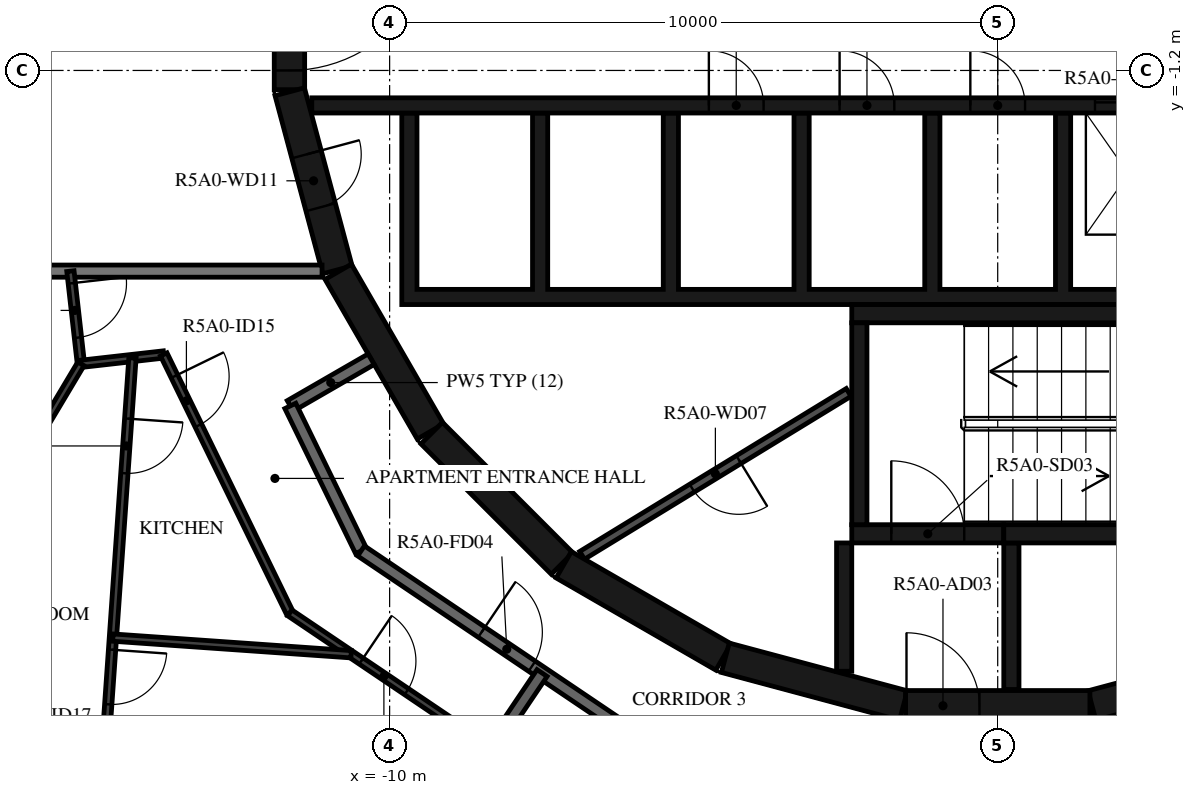
"""IFC4 building model, lengths in metres.
Left out: names, types, materials, properties, quantities, classifications, styles, units other than length and angle.
Written with IfcOpenShell. Run it as: python <this file> out.ifc"""

import sys

from ifc_helpers import new_model, si_unit, direction, frame, frame_2d, origin, place, context, subcontext, project, spatial, polyline, rectangle, outline, extrude, element, fill, save


model = new_model("IFC4")
c1 = context("Model", 3, precision=1e-05, world=origin(), true_north=direction((0.0, 1.0)))
c2 = subcontext(c1, "Body", "Model", "MODEL_VIEW")
j1 = project(units=[si_unit("LENGTHUNIT", "METRE"), si_unit("PLANEANGLEUNIT", "RADIAN")], contexts=[c1])
p1 = place(None, origin())
s1 = spatial("IfcSite", under=j1, at=p1, CompositionType="ELEMENT")
p2 = place(p1, origin())
s2 = spatial("IfcBuilding", under=s1, at=p2, CompositionType="ELEMENT")
p3 = place(p2, frame((0.0, 0.0, 195.4)))
s3 = spatial("IfcBuildingStorey", under=s2, at=p3, CompositionType="ELEMENT", Elevation=195.4)
p4 = place(p3, frame((1.55, -11.643, 0.0), z_axis=(0.0, 0.0, 1.0), x_axis=(0.965948410781, 0.258734743916, 0.0)))
e1 = element("IfcWall", 1, at=p4, inside=s3, PredefinedType="SHEAR", context=c2, shape_type="SweptSolid", body=[
    extrude(rectangle(XDim=3.033, YDim=0.5, at=frame_2d((1.516, 0.0))), origin(), (0.0, 0.0, 1.0), 3.12),
])
p5 = place(p3, frame((-11.647, 1.516, 0.0), z_axis=(0.0, 0.0, 1.0), x_axis=(0.0, -1.0, 0.0)))
e2 = element("IfcWall", 2, at=p5, inside=s3, PredefinedType="SHEAR", context=c2, shape_type="SweptSolid", body=[
    extrude(rectangle(XDim=3.033, YDim=0.5, at=frame_2d((1.516, 0.0))), origin(), (0.0, 0.0, 1.0), 3.12),
])
p6 = place(p5, frame((0.316, 0.0, 0.0)))
e3 = element("IfcOpeningElement", 3, at=p6, cuts=e2, PredefinedType="OPENING", context=c2, shape_type="SweptSolid", body=[
    extrude(rectangle(XDim=2.4, YDim=2.1, at=frame_2d((1.2, 1.05))), frame((0.0, 0.26, 0.0), z_axis=(0.0, -1.0, 0.0), x_axis=(1.0, 0.0, 0.0)), (0.0, 0.0, 1.0), 0.52),
])
p7 = place(p3, frame((-11.643, -1.55, 0.0), z_axis=(0.0, 0.0, 1.0), x_axis=(0.258734743916, -0.965948410781, 0.0)))
e4 = element("IfcWall", 4, at=p7, inside=s3, PredefinedType="SHEAR", context=c2, shape_type="SweptSolid", body=[
    extrude(rectangle(XDim=3.033, YDim=0.5, at=frame_2d((1.516, 0.0))), origin(), (0.0, 0.0, 1.0), 3.12),
])
p8 = place(p7, frame((1.066, 0.0, 0.0)))
e5 = element("IfcOpeningElement", 5, at=p8, cuts=e4, PredefinedType="OPENING", context=c2, shape_type="SweptSolid", body=[
    extrude(rectangle(XDim=0.9, YDim=2.1, at=frame_2d((0.45, 1.05))), frame((0.0, 0.26, 0.0), z_axis=(0.0, -1.0, 0.0), x_axis=(1.0, 0.0, 0.0)), (0.0, 0.0, 1.0), 0.52),
])
p9 = place(p3, frame((-10.845, -4.51, 0.0), z_axis=(0.0, 0.0, 1.0), x_axis=(0.500087131594, -0.865975092491, 0.0)))
e6 = element("IfcWall", 6, at=p9, inside=s3, PredefinedType="SHEAR", context=c2, shape_type="SweptSolid", body=[
    extrude(rectangle(XDim=3.033, YDim=0.5, at=frame_2d((1.516, 0.0))), origin(), (0.0, 0.0, 1.0), 3.12),
])
p10 = place(p3, frame((-9.308, -7.164, 0.0), z_axis=(0.0, 0.0, 1.0), x_axis=(0.707106781187, -0.707106781187, 0.0)))
e7 = element("IfcWall", 7, at=p10, inside=s3, PredefinedType="SHEAR", context=c2, shape_type="SweptSolid", body=[
    extrude(rectangle(XDim=3.032, YDim=0.5, at=frame_2d((1.516, 0.0))), origin(), (0.0, 0.0, 1.0), 3.12),
])
for number, where, z_axis, x_axis in (
    (8, (-7.137, -9.329, 0.0), (0.0, 0.0, 1.0), (0.866, -0.5, 0.0)),
    (9, (-4.479, -10.858, 0.0), (0.0, 0.0, 1.0), (0.966, -0.259, 0.0)),
):
    element("IfcWall", number, at=place(p3, frame(where, z_axis=z_axis, x_axis=x_axis)), inside=s3, PredefinedType="SHEAR", context=c2, shape_type="SweptSolid", body=[
        extrude(rectangle(XDim=3.033, YDim=0.5, at=frame_2d((1.516, 0.0))), origin(), (0.0, 0.0, 1.0), 3.12),
    ])
p11 = place(p3, frame((-1.516, -11.647, 0.0), z_axis=(0.0, 0.0, 1.0), x_axis=(1.0, 0.0, 0.0)))
e10 = element("IfcWall", 10, at=p11, inside=s3, PredefinedType="SHEAR", context=c2, shape_type="SweptSolid", body=[
    extrude(rectangle(XDim=3.033, YDim=0.5, at=frame_2d((1.516, 0.0))), origin(), (0.0, 0.0, 1.0), 3.12),
])
p12 = place(p11, frame((0.016, 0.0, 0.0)))
e11 = element("IfcOpeningElement", 11, at=p12, cuts=e10, PredefinedType="OPENING", context=c2, shape_type="SweptSolid", body=[
    extrude(rectangle(XDim=1.2, YDim=2.1, at=frame_2d((0.6, 1.05))), frame((0.0, 0.26, 0.0), z_axis=(0.0, -1.0, 0.0), x_axis=(1.0, 0.0, 0.0)), (0.0, 0.0, 1.0), 0.52),
])
p13 = place(p3, frame((-2.275, -8.67, 0.0), z_axis=(0.0, 0.0, 1.0), x_axis=(0.0, 1.0, 0.0)))
e12 = element("IfcWall", 12, at=p13, inside=s3, PredefinedType="SHEAR", context=c2, shape_type="SweptSolid", body=[
    extrude(rectangle(XDim=3.32, YDim=0.25, at=frame_2d((1.66, 0.0))), origin(), (0.0, 0.0, 1.0), 3.12),
])
p14 = place(p3, frame((-2.4, -5.2, 0.0), z_axis=(0.0, 0.0, 1.0), x_axis=(1.0, 0.0, 0.0)))
e13 = element("IfcWall", 13, at=p14, inside=s3, PredefinedType="SHEAR", context=c2, shape_type="SweptSolid", body=[
    extrude(rectangle(XDim=7.05, YDim=0.3, at=frame_2d((3.525, 0.0))), origin(), (0.0, 0.0, 1.0), 3.12),
])
p15 = place(p3, frame((0.1, -8.82, 0.0), z_axis=(0.0, 0.0, 1.0), x_axis=(1.0, 0.0, 0.0)))
e14 = element("IfcWall", 14, at=p15, inside=s3, PredefinedType="SHEAR", context=c2, shape_type="SweptSolid", body=[
    extrude(rectangle(XDim=4.55, YDim=0.3, at=frame_2d((2.275, 0.0))), origin(), (0.0, 0.0, 1.0), 3.12),
])
p16 = place(p3, frame((-2.4, -8.82, 0.0), z_axis=(0.0, 0.0, 1.0), x_axis=(1.0, 0.0, 0.0)))
e15 = element("IfcWall", 15, at=p16, inside=s3, PredefinedType="SHEAR", context=c2, shape_type="SweptSolid", body=[
    extrude(rectangle(XDim=2.5, YDim=0.3, at=frame_2d((1.25, 0.0))), origin(), (0.0, 0.0, 1.0), 3.12),
])
p17 = place(p16, frame((0.65, 0.0, 0.0)))
e16 = element("IfcOpeningElement", 16, at=p17, cuts=e15, PredefinedType="OPENING", context=c2, shape_type="SweptSolid", body=[
    extrude(rectangle(XDim=1.2, YDim=2.1, at=frame_2d((0.6, 1.05))), frame((0.0, 0.16, 0.0), z_axis=(0.0, -1.0, 0.0), x_axis=(1.0, 0.0, 0.0)), (0.0, 0.0, 1.0), 0.32),
])
p18 = place(p3, frame((-2.525, -8.97, 0.0), z_axis=(0.0, 0.0, 1.0), x_axis=(0.0, -1.0, 0.0)))
e17 = element("IfcWall", 17, at=p18, inside=s3, PredefinedType="SHEAR", context=c2, shape_type="SweptSolid", body=[
    extrude(rectangle(XDim=2.11, YDim=0.25, at=frame_2d((1.055, 0.0))), origin(), (0.0, 0.0, 1.0), 3.12),
])
p19 = place(p3, frame((0.225, -8.97, 0.0), z_axis=(0.0, 0.0, 1.0), x_axis=(0.0, -1.0, 0.0)))
e18 = element("IfcWall", 18, at=p19, inside=s3, PredefinedType="SHEAR", context=c2, shape_type="SweptSolid", body=[
    extrude(rectangle(XDim=2.41, YDim=0.25, at=frame_2d((1.205, 0.0))), origin(), (0.0, 0.0, 1.0), 3.12),
])
p20 = place(p3, origin())
e19 = element("IfcWall", 19, at=p20, inside=s3, PredefinedType="SHEAR", context=c2, shape_type="SweptSolid", body=[
    extrude(outline(polyline([(9.8, -5.05), (9.8, -4.8), (9.8, -1.9), (9.55, -1.9), (9.55, -4.8), (7.65, -4.8), (7.65, -1.9), (7.4, -1.9), (7.4, -4.8), (5.5, -4.8), (5.5, -1.9), (5.25, -1.9), (5.25, -4.8), (3.35, -4.8), (3.35, -1.9), (3.1, -1.9), (3.1, -4.8), (1.2, -4.8), (1.2, -1.9), (0.95, -1.9), (0.95, -4.8), (-0.95, -4.8), (-0.95, -1.9), (-1.2, -1.9), (-1.2, -4.8), (-3.1, -4.8), (-3.1, -1.9), (-3.35, -1.9), (-3.35, -4.8), (-5.25, -4.8), (-5.25, -1.9), (-5.5, -1.9), (-5.5, -4.8), (-7.4, -4.8), (-7.4, -1.9), (-7.65, -1.9), (-7.65, -4.8), (-9.55, -4.8), (-9.55, -1.9), (-9.8, -1.9), (-9.8, -4.8), (-9.8, -5.05), (9.8, -5.05)])), origin(), (0.0, 0.0, 1.0), 3.12),
])
p21 = place(p3, frame((-11.28, -1.775, 0.0), z_axis=(0.0, 0.0, 1.0), x_axis=(1.0, 0.0, 0.0)))
e20 = element("IfcWall", 20, at=p21, inside=s3, PredefinedType="SHEAR", context=c2, shape_type="SweptSolid", body=[
    extrude(rectangle(XDim=14.38, YDim=0.25, at=frame_2d((7.19, 0.0))), origin(), (0.0, 0.0, 1.0), 3.12),
])
p22 = place(p21, frame((12.88, 0.0, 0.0)))
e21 = element("IfcOpeningElement", 21, at=p22, cuts=e20, PredefinedType="OPENING", context=c2, shape_type="SweptSolid", body=[
    extrude(rectangle(XDim=1.1, YDim=2.1, at=frame_2d((0.55, 1.05))), frame((0.0, 0.135, 0.0), z_axis=(0.0, -1.0, 0.0), x_axis=(1.0, 0.0, 0.0)), (0.0, 0.0, 1.0), 0.27),
])
p23 = place(p21, frame((6.53, 0.0, 0.0)))
e22 = element("IfcOpeningElement", 22, at=p23, cuts=e20, PredefinedType="OPENING", context=c2, shape_type="SweptSolid", body=[
    extrude(rectangle(XDim=0.9, YDim=2.1, at=frame_2d((0.45, 1.05))), frame((0.0, 0.135, 0.0), z_axis=(0.0, -1.0, 0.0), x_axis=(1.0, 0.0, 0.0)), (0.0, 0.0, 1.0), 0.27),
])
p24 = place(p21, frame((8.68, 0.0, 0.0)))
e23 = element("IfcOpeningElement", 23, at=p24, cuts=e20, PredefinedType="OPENING", context=c2, shape_type="SweptSolid", body=[
    extrude(rectangle(XDim=0.9, YDim=2.1, at=frame_2d((0.45, 1.05))), frame((0.0, 0.135, 0.0), z_axis=(0.0, -1.0, 0.0), x_axis=(1.0, 0.0, 0.0)), (0.0, 0.0, 1.0), 0.27),
])
p25 = place(p21, frame((10.83, 0.0, 0.0)))
e24 = element("IfcOpeningElement", 24, at=p25, cuts=e20, PredefinedType="OPENING", context=c2, shape_type="SweptSolid", body=[
    extrude(rectangle(XDim=0.9, YDim=2.1, at=frame_2d((0.45, 1.05))), frame((0.0, 0.135, 0.0), z_axis=(0.0, -1.0, 0.0), x_axis=(1.0, 0.0, 0.0)), (0.0, 0.0, 1.0), 0.27),
])
p26 = place(p3, frame((-2.451, -6.495, 0.0), z_axis=(0.0, 0.0, 1.0), x_axis=(-0.853250115418, -0.521501908471, 0.0)))
e25 = element("IfcWall", 25, at=p26, inside=s3, PredefinedType="PARTITIONING", context=c2, shape_type="SweptSolid", body=[
    extrude(rectangle(XDim=5.137, YDim=0.15, at=frame_2d((2.569, 0.0))), origin(), (0.0, 0.0, 1.0), 3.12),
])
p27 = place(p26, frame((2.119, 0.0, 0.0)))
e26 = element("IfcOpeningElement", 26, at=p27, cuts=e25, PredefinedType="OPENING", context=c2, shape_type="SweptSolid", body=[
    extrude(rectangle(XDim=0.9, YDim=2.1, at=frame_2d((0.45, 1.05))), frame((0.0, 0.085, 0.0), z_axis=(0.0, -1.0, 0.0), x_axis=(1.0, 0.0, 0.0)), (0.0, 0.0, 1.0), 0.17),
])
p28 = place(p3, frame((-10.303, -5.949, 0.0), z_axis=(0.0, 0.0, 1.0), x_axis=(-0.866042588199, -0.499970234539, 0.0)))
e27 = element("IfcWall", 27, at=p28, inside=s3, PredefinedType="STANDARD", context=c2, shape_type="SweptSolid", body=[
    extrude(rectangle(XDim=1.535, YDim=0.2, at=frame_2d((0.768, 0.0))), origin(), (0.0, 0.0, 1.0), 3.12),
])
p29 = place(p3, frame((-11.633, -6.716, 0.0), z_axis=(0.0, 0.0, 1.0), x_axis=(0.438322116278, -0.898817958422, 0.0)))
e28 = element("IfcWall", 28, at=p29, inside=s3, PredefinedType="STANDARD", context=c2, shape_type="SweptSolid", body=[
    extrude(rectangle(XDim=2.654, YDim=0.2, at=frame_2d((1.327, 0.0))), origin(), (0.0, 0.0, 1.0), 3.12),
])
p30 = place(p3, frame((-10.47, -9.101, 0.0), z_axis=(0.0, 0.0, 1.0), x_axis=(0.829035841718, -0.559195469534, 0.0)))
e29 = element("IfcWall", 29, at=p30, inside=s3, PredefinedType="STANDARD", context=c2, shape_type="SweptSolid", body=[
    extrude(rectangle(XDim=7.181, YDim=0.2, at=frame_2d((3.591, 0.0))), origin(), (0.0, 0.0, 1.0), 3.12),
])
p31 = place(p30, frame((2.39, 0.0, 0.0)))
e30 = element("IfcOpeningElement", 30, at=p31, cuts=e29, PredefinedType="OPENING", context=c2, shape_type="SweptSolid", body=[
    extrude(rectangle(XDim=1.0, YDim=2.1, at=frame_2d((0.5, 1.05))), frame((0.0, 0.11, 0.0), z_axis=(0.0, -1.0, 0.0), x_axis=(1.0, 0.0, 0.0)), (0.0, 0.0, 1.0), 0.22),
])
p32 = place(p3, frame((-18.55, -4.5, 0.0), z_axis=(0.0, 0.0, 1.0), x_axis=(1.0, 0.0, 0.0)))
e31 = element("IfcWall", 31, at=p32, inside=s3, PredefinedType="STANDARD", context=c2, shape_type="SweptSolid", body=[
    extrude(rectangle(XDim=7.438, YDim=0.2, at=frame_2d((3.719, 0.0))), origin(), (0.0, 0.0, 1.0), 3.12),
])
p33 = place(p3, frame((-10.407, -15.43, 0.0), z_axis=(0.0, 0.0, 1.0), x_axis=(0.559038328133, 0.829141813973, 0.0)))
e32 = element("IfcWall", 32, at=p33, inside=s3, PredefinedType="STANDARD", context=c2, shape_type="SweptSolid", body=[
    extrude(rectangle(XDim=5.212, YDim=0.2, at=frame_2d((2.606, 0.0))), origin(), (0.0, 0.0, 1.0), 3.12),
])
p34 = place(p3, frame((-15.25, -4.5, 0.0), z_axis=(0.0, 0.0, 1.0), x_axis=(0.1124919794, -0.99365263275, 0.0)))
e33 = element("IfcWall", 33, at=p34, inside=s3, PredefinedType="PARTITIONING", context=c2, shape_type="SweptSolid", body=[
    extrude(rectangle(XDim=1.534, YDim=0.12, at=frame_2d((0.767, 0.0))), origin(), (0.0, 0.0, 1.0), 3.12),
])
p35 = place(p34, frame((0.2, 0.0, 0.0)))
e34 = element("IfcOpeningElement", 34, at=p35, cuts=e33, PredefinedType="OPENING", context=c2, shape_type="SweptSolid", body=[
    extrude(rectangle(XDim=0.9, YDim=2.1, at=frame_2d((0.45, 1.05))), frame((0.0, 0.07, 0.0), z_axis=(0.0, -1.0, 0.0), x_axis=(1.0, 0.0, 0.0)), (0.0, 0.0, 1.0), 0.14),
])
p36 = place(p3, frame((-15.077, -6.025, 0.0), z_axis=(0.0, 0.0, 1.0), x_axis=(0.993646958109, 0.112542092746, 0.0)))
e35 = element("IfcWall", 35, at=p36, inside=s3, PredefinedType="PARTITIONING", context=c2, shape_type="SweptSolid", body=[
    extrude(rectangle(XDim=1.371, YDim=0.12, at=frame_2d((0.686, 0.0))), origin(), (0.0, 0.0, 1.0), 3.12),
])
p37 = place(p3, frame((-13.715, -5.87, 0.0), z_axis=(0.0, 0.0, 1.0), x_axis=(0.438372766482, -0.89879325632, 0.0)))
e36 = element("IfcWall", 36, at=p37, inside=s3, PredefinedType="PARTITIONING", context=c2, shape_type="SweptSolid", body=[
    extrude(rectangle(XDim=4.728, YDim=0.12, at=frame_2d((2.364, 0.0))), origin(), (0.0, 0.0, 1.0), 3.12),
])
p38 = place(p37, frame((0.4, 0.0, 0.0)))
e37 = element("IfcOpeningElement", 37, at=p38, cuts=e36, PredefinedType="OPENING", context=c2, shape_type="SweptSolid", body=[
    extrude(rectangle(XDim=0.9, YDim=2.1, at=frame_2d((0.45, 1.05))), frame((0.0, 0.07, 0.0), z_axis=(0.0, -1.0, 0.0), x_axis=(1.0, 0.0, 0.0)), (0.0, 0.0, 1.0), 0.14),
])
p39 = place(p3, frame((-11.642, -10.12, 0.0), z_axis=(0.0, 0.0, 1.0), x_axis=(0.829018066952, -0.559221820629, 0.0)))
e38 = element("IfcWall", 38, at=p39, inside=s3, PredefinedType="PARTITIONING", context=c2, shape_type="SweptSolid", body=[
    extrude(rectangle(XDim=3.992, YDim=0.12, at=frame_2d((1.996, 0.0))), origin(), (0.0, 0.0, 1.0), 3.12),
])
p40 = place(p39, frame((1.417, 0.0, 0.0)))
e39 = element("IfcOpeningElement", 39, at=p40, cuts=e38, PredefinedType="OPENING", context=c2, shape_type="SweptSolid", body=[
    extrude(rectangle(XDim=0.9, YDim=2.1, at=frame_2d((0.45, 1.05))), frame((0.0, 0.07, 0.0), z_axis=(0.0, -1.0, 0.0), x_axis=(1.0, 0.0, 0.0)), (0.0, 0.0, 1.0), 0.14),
])
p41 = place(p3, frame((-19.156, -12.863, 0.0), z_axis=(0.0, 0.0, 1.0), x_axis=(0.512316386407, 0.858796786335, 0.0)))
e40 = element("IfcWall", 40, at=p41, inside=s3, PredefinedType="PARTITIONING", context=c2, shape_type="SweptSolid", body=[
    extrude(rectangle(XDim=7.963, YDim=0.12, at=frame_2d((3.981, 0.0))), origin(), (0.0, 0.0, 1.0), 3.12),
])
p42 = place(p3, frame((-14.229, -5.929, 0.0), z_axis=(0.0, 0.0, 1.0), x_axis=(-0.069740723375, -0.997565151508, 0.0)))
e41 = element("IfcWall", 41, at=p42, inside=s3, PredefinedType="PARTITIONING", context=c2, shape_type="SweptSolid", body=[
    extrude(rectangle(XDim=10.47, YDim=0.12, at=frame_2d((5.235, 0.0))), origin(), (0.0, 0.0, 1.0), 3.12),
])
p43 = place(p42, frame((4.809, 0.0, 0.0)))
e42 = element("IfcOpeningElement", 42, at=p43, cuts=e41, PredefinedType="OPENING", context=c2, shape_type="SweptSolid", body=[
    extrude(rectangle(XDim=0.9, YDim=2.1, at=frame_2d((0.45, 1.05))), frame((0.0, 0.07, 0.0), z_axis=(0.0, -1.0, 0.0), x_axis=(1.0, 0.0, 0.0)), (0.0, 0.0, 1.0), 0.14),
])
p44 = place(p42, frame((1.0, 0.0, 0.0)))
e43 = element("IfcOpeningElement", 43, at=p44, cuts=e41, PredefinedType="OPENING", context=c2, shape_type="SweptSolid", body=[
    extrude(rectangle(XDim=0.9, YDim=2.1, at=frame_2d((0.45, 1.05))), frame((0.0, 0.07, 0.0), z_axis=(0.0, -1.0, 0.0), x_axis=(1.0, 0.0, 0.0)), (0.0, 0.0, 1.0), 0.14),
])
p45 = place(p3, frame((-14.551, -10.527, 0.0), z_axis=(0.0, 0.0, 1.0), x_axis=(0.997564247633, -0.069753651118, 0.0)))
e44 = element("IfcWall", 44, at=p45, inside=s3, PredefinedType="PARTITIONING", context=c2, shape_type="SweptSolid", body=[
    extrude(rectangle(XDim=3.927, YDim=0.12, at=frame_2d((1.963, 0.0))), origin(), (0.0, 0.0, 1.0), 3.12),
])
p46 = place(p17, origin())
e45 = element("IfcDoor", 45, at=p46, inside=s3, OperationType="SINGLE_SWING_LEFT", PredefinedType="DOOR", context=c2, shape_type="SweptSolid", body=[
    extrude(rectangle(XDim=1.2, YDim=2.1, at=frame_2d((0.6, 1.05))), frame((0.0, 0.025, 0.0), z_axis=(0.0, -1.0, 0.0), x_axis=(1.0, 0.0, 0.0)), (0.0, 0.0, 1.0), 0.05),
])
fill(e16, e45)
p47 = place(p12, origin())
e46 = element("IfcDoor", 46, at=p47, inside=s3, OperationType="SINGLE_SWING_RIGHT", PredefinedType="DOOR", context=c2, shape_type="SweptSolid", body=[
    extrude(rectangle(XDim=1.2, YDim=2.1, at=frame_2d((0.6, 1.05))), frame((0.0, 0.025, 0.0), z_axis=(0.0, -1.0, 0.0), x_axis=(1.0, 0.0, 0.0)), (0.0, 0.0, 1.0), 0.05),
])
fill(e11, e46)
p48 = place(p6, origin())
e47 = element("IfcDoor", 47, at=p48, inside=s3, OperationType="DOUBLE_DOOR_SINGLE_SWING", PredefinedType="DOOR", context=c2, shape_type="SweptSolid", body=[
    extrude(rectangle(XDim=2.4, YDim=2.1, at=frame_2d((1.2, 1.05))), frame((0.0, 0.025, 0.0), z_axis=(0.0, -1.0, 0.0), x_axis=(1.0, 0.0, 0.0)), (0.0, 0.0, 1.0), 0.05),
])
fill(e3, e47)
p49 = place(p22, origin())
e48 = element("IfcDoor", 48, at=p49, inside=s3, OperationType="DOUBLE_DOOR_SLIDING", PredefinedType="DOOR", context=c2, shape_type="SweptSolid", body=[
    extrude(rectangle(XDim=1.1, YDim=2.1, at=frame_2d((0.55, 1.05))), frame((0.0, 0.025, 0.0), z_axis=(0.0, -1.0, 0.0), x_axis=(1.0, 0.0, 0.0)), (0.0, 0.0, 1.0), 0.05),
])
fill(e21, e48)
p50 = place(p23, origin())
e49 = element("IfcDoor", 49, at=p50, inside=s3, OperationType="SINGLE_SWING_RIGHT", PredefinedType="DOOR", context=c2, shape_type="SweptSolid", body=[
    extrude(rectangle(XDim=0.9, YDim=2.1, at=frame_2d((0.45, 1.05))), frame((0.0, 0.025, 0.0), z_axis=(0.0, -1.0, 0.0), x_axis=(1.0, 0.0, 0.0)), (0.0, 0.0, 1.0), 0.05),
])
fill(e22, e49)
p51 = place(p24, origin())
e50 = element("IfcDoor", 50, at=p51, inside=s3, OperationType="SINGLE_SWING_LEFT", PredefinedType="DOOR", context=c2, shape_type="SweptSolid", body=[
    extrude(rectangle(XDim=0.9, YDim=2.1, at=frame_2d((0.45, 1.05))), frame((0.0, 0.025, 0.0), z_axis=(0.0, -1.0, 0.0), x_axis=(1.0, 0.0, 0.0)), (0.0, 0.0, 1.0), 0.05),
])
fill(e23, e50)
p52 = place(p25, origin())
e51 = element("IfcDoor", 51, at=p52, inside=s3, OperationType="SINGLE_SWING_RIGHT", PredefinedType="DOOR", context=c2, shape_type="SweptSolid", body=[
    extrude(rectangle(XDim=0.9, YDim=2.1, at=frame_2d((0.45, 1.05))), frame((0.0, 0.025, 0.0), z_axis=(0.0, -1.0, 0.0), x_axis=(1.0, 0.0, 0.0)), (0.0, 0.0, 1.0), 0.05),
])
fill(e24, e51)
p53 = place(p27, origin())
e52 = element("IfcDoor", 52, at=p53, inside=s3, OperationType="SINGLE_SWING_LEFT", PredefinedType="DOOR", context=c2, shape_type="SweptSolid", body=[
    extrude(rectangle(XDim=0.9, YDim=2.1, at=frame_2d((0.45, 1.05))), frame((0.0, 0.025, 0.0), z_axis=(0.0, -1.0, 0.0), x_axis=(1.0, 0.0, 0.0)), (0.0, 0.0, 1.0), 0.05),
])
fill(e26, e52)
p54 = place(p8, origin())
e53 = element("IfcDoor", 53, at=p54, inside=s3, OperationType="SINGLE_SWING_LEFT", PredefinedType="DOOR", context=c2, shape_type="SweptSolid", body=[
    extrude(rectangle(XDim=0.9, YDim=2.1, at=frame_2d((0.45, 1.05))), frame((0.0, 0.025, 0.0), z_axis=(0.0, -1.0, 0.0), x_axis=(1.0, 0.0, 0.0)), (0.0, 0.0, 1.0), 0.05),
])
fill(e5, e53)
p55 = place(p31, origin())
e54 = element("IfcDoor", 54, at=p55, inside=s3, OperationType="SINGLE_SWING_RIGHT", PredefinedType="DOOR", context=c2, shape_type="SweptSolid", body=[
    extrude(rectangle(XDim=1.0, YDim=2.1, at=frame_2d((0.5, 1.05))), frame((0.0, 0.025, 0.0), z_axis=(0.0, -1.0, 0.0), x_axis=(1.0, 0.0, 0.0)), (0.0, 0.0, 1.0), 0.05),
])
fill(e30, e54)
p56 = place(p35, origin())
e55 = element("IfcDoor", 55, at=p56, inside=s3, OperationType="SINGLE_SWING_RIGHT", PredefinedType="DOOR", context=c2, shape_type="SweptSolid", body=[
    extrude(rectangle(XDim=0.9, YDim=2.1, at=frame_2d((0.45, 1.05))), frame((0.0, 0.025, 0.0), z_axis=(0.0, -1.0, 0.0), x_axis=(1.0, 0.0, 0.0)), (0.0, 0.0, 1.0), 0.05),
])
fill(e34, e55)
p57 = place(p38, origin())
e56 = element("IfcDoor", 56, at=p57, inside=s3, OperationType="SINGLE_SWING_RIGHT", PredefinedType="DOOR", context=c2, shape_type="SweptSolid", body=[
    extrude(rectangle(XDim=0.9, YDim=2.1, at=frame_2d((0.45, 1.05))), frame((0.0, 0.025, 0.0), z_axis=(0.0, -1.0, 0.0), x_axis=(1.0, 0.0, 0.0)), (0.0, 0.0, 1.0), 0.05),
])
fill(e37, e56)
p58 = place(p40, origin())
e57 = element("IfcDoor", 57, at=p58, inside=s3, OperationType="SINGLE_SWING_RIGHT", PredefinedType="DOOR", context=c2, shape_type="SweptSolid", body=[
    extrude(rectangle(XDim=0.9, YDim=2.1, at=frame_2d((0.45, 1.05))), frame((0.0, 0.025, 0.0), z_axis=(0.0, -1.0, 0.0), x_axis=(1.0, 0.0, 0.0)), (0.0, 0.0, 1.0), 0.05),
])
fill(e39, e57)
p59 = place(p43, origin())
e58 = element("IfcDoor", 58, at=p59, inside=s3, OperationType="SINGLE_SWING_RIGHT", PredefinedType="DOOR", context=c2, shape_type="SweptSolid", body=[
    extrude(rectangle(XDim=0.9, YDim=2.1, at=frame_2d((0.45, 1.05))), frame((0.0, 0.025, 0.0), z_axis=(0.0, -1.0, 0.0), x_axis=(1.0, 0.0, 0.0)), (0.0, 0.0, 1.0), 0.05),
])
fill(e42, e58)
p60 = place(p44, origin())
e59 = element("IfcDoor", 59, at=p60, inside=s3, OperationType="SINGLE_SWING_LEFT", PredefinedType="DOOR", context=c2, shape_type="SweptSolid", body=[
    extrude(rectangle(XDim=0.9, YDim=2.1, at=frame_2d((0.45, 1.05))), frame((0.0, 0.025, 0.0), z_axis=(0.0, -1.0, 0.0), x_axis=(1.0, 0.0, 0.0)), (0.0, 0.0, 1.0), 0.05),
])
fill(e43, e59)
save(model, sys.argv[1])
